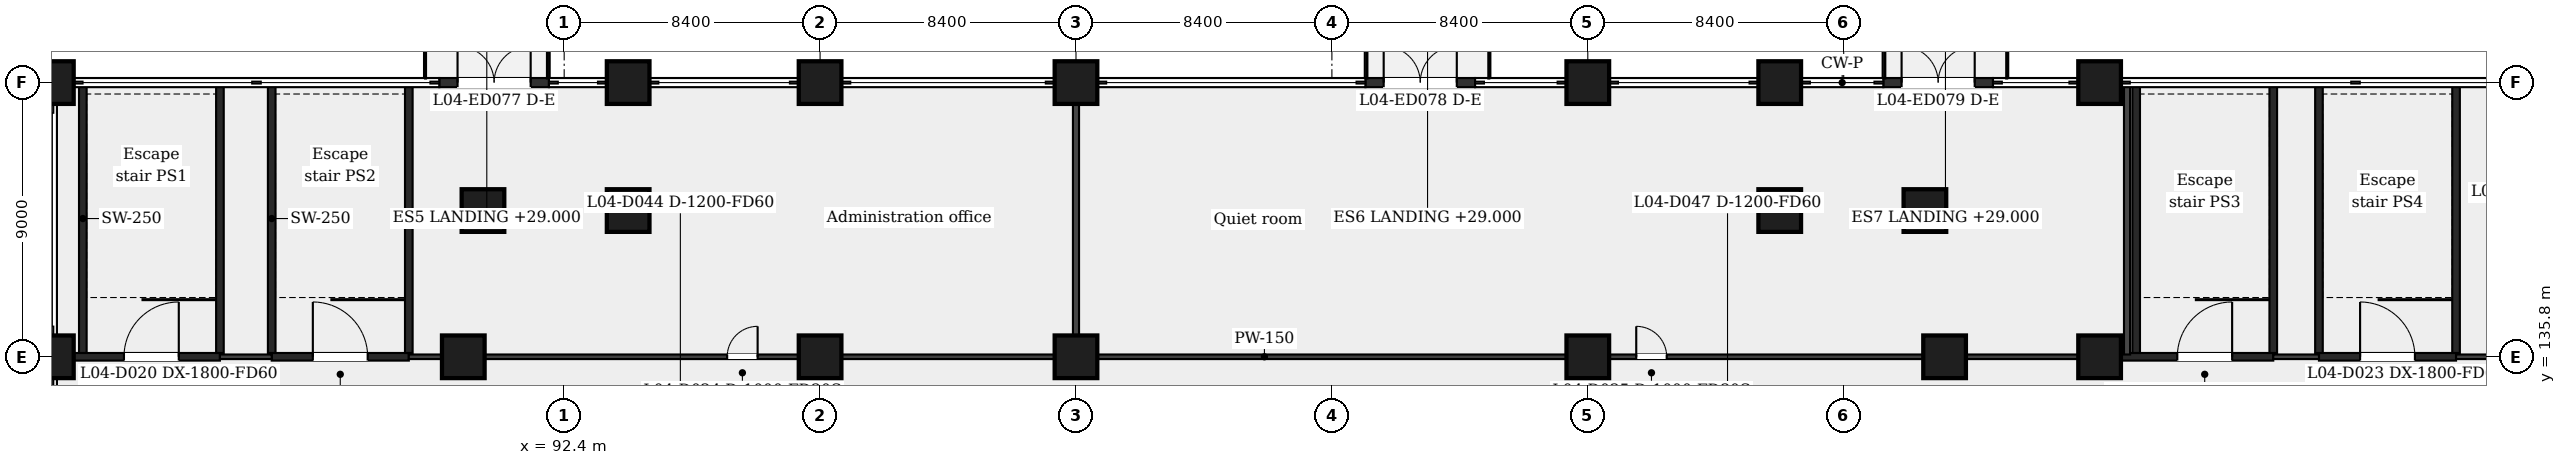
"""IFC4 building model, lengths in metres.
Left out: names, types, materials, properties, quantities, classifications, styles, units other than length and angle.
Written with IfcOpenShell. Run it as: python <this file> out.ifc"""

import sys

from ifc_helpers import new_model, si_unit, direction, frame, frame_2d, origin, origin_2d, place, context, subcontext, project, spatial, rectangle, extrude, element, fill, save


model = new_model("IFC4")
c1 = context("Model", 3, precision=1e-05, world=origin(), true_north=direction((0.0, 1.0)))
c2 = subcontext(c1, "Body", "Model", "MODEL_VIEW")
j1 = project(units=[si_unit("LENGTHUNIT", "METRE"), si_unit("PLANEANGLEUNIT", "RADIAN")], contexts=[c1])
p1 = place(None, origin())
s1 = spatial("IfcSite", under=j1, at=p1, CompositionType="ELEMENT")
p2 = place(p1, origin())
s2 = spatial("IfcBuilding", under=s1, at=p2, CompositionType="ELEMENT")
p3 = place(p2, frame((0.0, 0.0, 29.0)))
s3 = spatial("IfcBuildingStorey", under=s2, at=p3, CompositionType="ELEMENT", Elevation=29.0)
for number, where, z_axis, x_axis in (
    (1, (75.6, 135.8, 0.0), (0.0, 0.0, 1.0), (1.0, 0.0, 0.0)),
    (2, (89.088, 135.8, 0.0), (0.0, 0.0, 1.0), (1.0, 0.0, 0.0)),
    (3, (100.8, 135.8, 0.0), (0.0, 0.0, 1.0), (1.0, 0.0, 0.0)),
    (4, (109.2, 135.8, 0.0), (0.0, 0.0, 1.0), (1.0, 0.0, 0.0)),
    (5, (126.0, 135.8, 0.0), (0.0, 0.0, 1.0), (1.0, 0.0, 0.0)),
    (6, (137.711, 135.8, 0.0), (0.0, 0.0, 1.0), (1.0, 0.0, 0.0)),
    (7, (142.8, 135.8, 0.0), (0.0, 0.0, 1.0), (1.0, 0.0, 0.0)),
    (8, (89.735, 140.6, 0.0), (0.0, 0.0, 1.0), (1.0, 0.0, 0.0)),
    (9, (94.5, 140.6, 0.0), (0.0, 0.0, 1.0), (1.0, 0.0, 0.0)),
    (10, (132.3, 140.6, 0.0), (0.0, 0.0, 1.0), (1.0, 0.0, 0.0)),
    (11, (137.065, 140.6, 0.0), (0.0, 0.0, 1.0), (1.0, 0.0, 0.0)),
    (12, (75.6, 144.8, 0.0), (0.0, 0.0, 1.0), (1.0, 0.0, 0.0)),
    (13, (94.5, 144.8, 0.0), (0.0, 0.0, 1.0), (1.0, 0.0, 0.0)),
    (14, (100.8, 144.8, 0.0), (0.0, 0.0, 1.0), (1.0, 0.0, 0.0)),
    (15, (109.2, 144.8, 0.0), (0.0, 0.0, 1.0), (1.0, 0.0, 0.0)),
    (16, (126.0, 144.8, 0.0), (0.0, 0.0, 1.0), (1.0, 0.0, 0.0)),
    (17, (132.3, 144.8, 0.0), (0.0, 0.0, 1.0), (1.0, 0.0, 0.0)),
    (18, (142.8, 144.8, 0.0), (0.0, 0.0, 1.0), (1.0, 0.0, 0.0)),
):
    element("IfcColumn", number, at=place(p3, frame(where, z_axis=z_axis, x_axis=x_axis)), inside=s3, PredefinedType="COLUMN", context=c2, shape_type="SweptSolid", body=[
        extrude(rectangle(XDim=1.4, YDim=1.4, at=origin_2d()), origin(), (0.0, 0.0, 1.0), 5.0),
    ])
p4 = place(p3, frame((88.3, 144.8, 0.0), z_axis=(0.0, 0.0, 1.0), x_axis=(1.0, 0.0, 0.0)))
e19 = element("IfcWall", 19, at=p4, inside=s3, PredefinedType="SOLIDWALL", context=c2, shape_type="SweptSolid", body=[
    extrude(rectangle(XDim=3.6, YDim=0.3, at=frame_2d((1.8, 0.0))), origin(), (0.0, 0.0, 1.0), 4.4),
])
p5 = place(p4, frame((0.6, 0.0, 0.0)))
e20 = element("IfcOpeningElement", 20, at=p5, cuts=e19, PredefinedType="OPENING", context=c2, shape_type="SweptSolid", body=[
    extrude(rectangle(XDim=2.4, YDim=2.4, at=frame_2d((1.2, 1.2))), frame((0.0, 0.16, 0.0), z_axis=(0.0, -1.0, 0.0), x_axis=(1.0, 0.0, 0.0)), (0.0, 0.0, 1.0), 0.32),
])
p6 = place(p3, frame((118.7, 144.8, 0.0), z_axis=(0.0, 0.0, 1.0), x_axis=(1.0, 0.0, 0.0)))
e21 = element("IfcWall", 21, at=p6, inside=s3, PredefinedType="SOLIDWALL", context=c2, shape_type="SweptSolid", body=[
    extrude(rectangle(XDim=3.6, YDim=0.3, at=frame_2d((1.8, 0.0))), origin(), (0.0, 0.0, 1.0), 4.4),
])
p7 = place(p6, frame((0.6, 0.0, 0.0)))
e22 = element("IfcOpeningElement", 22, at=p7, cuts=e21, PredefinedType="OPENING", context=c2, shape_type="SweptSolid", body=[
    extrude(rectangle(XDim=2.4, YDim=2.4, at=frame_2d((1.2, 1.2))), frame((0.0, 0.16, 0.0), z_axis=(0.0, -1.0, 0.0), x_axis=(1.0, 0.0, 0.0)), (0.0, 0.0, 1.0), 0.32),
])
p8 = place(p3, frame((135.7, 144.8, 0.0), z_axis=(0.0, 0.0, 1.0), x_axis=(1.0, 0.0, 0.0)))
e23 = element("IfcWall", 23, at=p8, inside=s3, PredefinedType="SOLIDWALL", context=c2, shape_type="SweptSolid", body=[
    extrude(rectangle(XDim=3.6, YDim=0.3, at=frame_2d((1.8, 0.0))), origin(), (0.0, 0.0, 1.0), 4.4),
])
p9 = place(p8, frame((0.6, 0.0, 0.0)))
e24 = element("IfcOpeningElement", 24, at=p9, cuts=e23, PredefinedType="OPENING", context=c2, shape_type="SweptSolid", body=[
    extrude(rectangle(XDim=2.4, YDim=2.4, at=frame_2d((1.2, 1.2))), frame((0.0, 0.16, 0.0), z_axis=(0.0, -1.0, 0.0), x_axis=(1.0, 0.0, 0.0)), (0.0, 0.0, 1.0), 0.32),
])
p10 = place(p3, frame((76.27, 135.8, 0.0), z_axis=(0.0, 0.0, 1.0), x_axis=(1.0, 0.0, 0.0)))
e25 = element("IfcWall", 25, at=p10, inside=s3, PredefinedType="PARTITIONING", context=c2, shape_type="SweptSolid", body=[
    extrude(rectangle(XDim=4.83, YDim=0.25, at=frame_2d((2.415, 0.0))), origin(), (0.0, 0.0, 1.0), 4.4),
])
p11 = place(p10, frame((1.68, 0.0, 0.0)))
e26 = element("IfcOpeningElement", 26, at=p11, cuts=e25, PredefinedType="OPENING", context=c2, shape_type="SweptSolid", body=[
    extrude(rectangle(XDim=1.8, YDim=2.1, at=frame_2d((0.9, 1.05))), frame((0.0, 0.135, 0.0), z_axis=(0.0, -1.0, 0.0), x_axis=(1.0, 0.0, 0.0)), (0.0, 0.0, 1.0), 0.27),
])
p12 = place(p3, frame((82.8, 135.8, 0.0), z_axis=(0.0, 0.0, 1.0), x_axis=(1.0, 0.0, 0.0)))
e27 = element("IfcWall", 27, at=p12, inside=s3, PredefinedType="PARTITIONING", context=c2, shape_type="SweptSolid", body=[
    extrude(rectangle(XDim=4.5, YDim=0.25, at=frame_2d((2.25, 0.0))), origin(), (0.0, 0.0, 1.0), 4.4),
])
p13 = place(p12, frame((1.35, 0.0, 0.0)))
e28 = element("IfcOpeningElement", 28, at=p13, cuts=e27, PredefinedType="OPENING", context=c2, shape_type="SweptSolid", body=[
    extrude(rectangle(XDim=1.8, YDim=2.1, at=frame_2d((0.9, 1.05))), frame((0.0, 0.135, 0.0), z_axis=(0.0, -1.0, 0.0), x_axis=(1.0, 0.0, 0.0)), (0.0, 0.0, 1.0), 0.27),
])
p14 = place(p3, frame((143.47, 135.8, 0.0), z_axis=(0.0, 0.0, 1.0), x_axis=(1.0, 0.0, 0.0)))
e29 = element("IfcWall", 29, at=p14, inside=s3, PredefinedType="PARTITIONING", context=c2, shape_type="SweptSolid", body=[
    extrude(rectangle(XDim=5.03, YDim=0.25, at=frame_2d((2.515, 0.0))), origin(), (0.0, 0.0, 1.0), 4.4),
])
p15 = place(p14, frame((1.88, 0.0, 0.0)))
e30 = element("IfcOpeningElement", 30, at=p15, cuts=e29, PredefinedType="OPENING", context=c2, shape_type="SweptSolid", body=[
    extrude(rectangle(XDim=1.8, YDim=2.1, at=frame_2d((0.9, 1.05))), frame((0.0, 0.135, 0.0), z_axis=(0.0, -1.0, 0.0), x_axis=(1.0, 0.0, 0.0)), (0.0, 0.0, 1.0), 0.27),
])
p16 = place(p3, frame((150.0, 135.8, 0.0), z_axis=(0.0, 0.0, 1.0), x_axis=(1.0, 0.0, 0.0)))
e31 = element("IfcWall", 31, at=p16, inside=s3, PredefinedType="PARTITIONING", context=c2, shape_type="SweptSolid", body=[
    extrude(rectangle(XDim=4.5, YDim=0.25, at=frame_2d((2.25, 0.0))), origin(), (0.0, 0.0, 1.0), 4.4),
])
p17 = place(p16, frame((1.35, 0.0, 0.0)))
e32 = element("IfcOpeningElement", 32, at=p17, cuts=e31, PredefinedType="OPENING", context=c2, shape_type="SweptSolid", body=[
    extrude(rectangle(XDim=1.8, YDim=2.1, at=frame_2d((0.9, 1.05))), frame((0.0, 0.135, 0.0), z_axis=(0.0, -1.0, 0.0), x_axis=(1.0, 0.0, 0.0)), (0.0, 0.0, 1.0), 0.27),
])
p18 = place(p3, frame((75.65, 135.8, 0.0), z_axis=(0.0, 0.0, 1.0), x_axis=(1.0, 0.0, 0.0)))
e33 = element("IfcWall", 33, at=p18, inside=s3, PredefinedType="PARTITIONING", context=c2, shape_type="SweptSolid", body=[
    extrude(rectangle(XDim=0.62, YDim=0.15, at=frame_2d((0.31, 0.0))), origin(), (0.0, 0.0, 1.0), 4.4),
])
p19 = place(p3, frame((81.1, 135.8, 0.0), z_axis=(0.0, 0.0, 1.0), x_axis=(1.0, 0.0, 0.0)))
e34 = element("IfcWall", 34, at=p19, inside=s3, PredefinedType="PARTITIONING", context=c2, shape_type="SweptSolid", body=[
    extrude(rectangle(XDim=1.7, YDim=0.15, at=frame_2d((0.85, 0.0))), origin(), (0.0, 0.0, 1.0), 4.4),
])
p20 = place(p3, frame((87.3, 135.8, 0.0), z_axis=(0.0, 0.0, 1.0), x_axis=(1.0, 0.0, 0.0)))
e35 = element("IfcWall", 35, at=p20, inside=s3, PredefinedType="PARTITIONING", context=c2, shape_type="SweptSolid", body=[
    extrude(rectangle(XDim=56.17, YDim=0.15, at=frame_2d((28.085, 0.0))), origin(), (0.0, 0.0, 1.0), 4.4),
])
p21 = place(p20, frame((10.45, 0.0, 0.0)))
e36 = element("IfcOpeningElement", 36, at=p21, cuts=e35, PredefinedType="OPENING", context=c2, shape_type="SweptSolid", body=[
    extrude(rectangle(XDim=1.0, YDim=2.1, at=frame_2d((0.5, 1.05))), frame((0.0, 0.085, 0.0), z_axis=(0.0, -1.0, 0.0), x_axis=(1.0, 0.0, 0.0)), (0.0, 0.0, 1.0), 0.17),
])
p22 = place(p20, frame((40.29, 0.0, 0.0)))
e37 = element("IfcOpeningElement", 37, at=p22, cuts=e35, PredefinedType="OPENING", context=c2, shape_type="SweptSolid", body=[
    extrude(rectangle(XDim=1.0, YDim=2.1, at=frame_2d((0.5, 1.05))), frame((0.0, 0.085, 0.0), z_axis=(0.0, -1.0, 0.0), x_axis=(1.0, 0.0, 0.0)), (0.0, 0.0, 1.0), 0.17),
])
p23 = place(p3, frame((148.5, 135.8, 0.0), z_axis=(0.0, 0.0, 1.0), x_axis=(1.0, 0.0, 0.0)))
e38 = element("IfcWall", 38, at=p23, inside=s3, PredefinedType="PARTITIONING", context=c2, shape_type="SweptSolid", body=[
    extrude(rectangle(XDim=1.5, YDim=0.15, at=frame_2d((0.75, 0.0))), origin(), (0.0, 0.0, 1.0), 4.4),
])
p24 = place(p3, frame((154.5, 135.8, 0.0), z_axis=(0.0, 0.0, 1.0), x_axis=(1.0, 0.0, 0.0)))
e39 = element("IfcWall", 39, at=p24, inside=s3, PredefinedType="PARTITIONING", context=c2, shape_type="SweptSolid", body=[
    extrude(rectangle(XDim=5.05, YDim=0.15, at=frame_2d((2.525, 0.0))), origin(), (0.0, 0.0, 1.0), 4.4),
])
for number, where, z_axis, x_axis in (
    (40, (76.6, 135.925, 0.0), (0.0, 0.0, 1.0), (0.0, 1.0, 0.0)),
    (41, (81.1, 135.925, 0.0), (0.0, 0.0, 1.0), (0.0, 1.0, 0.0)),
    (42, (82.8, 135.925, 0.0), (0.0, 0.0, 1.0), (0.0, 1.0, 0.0)),
    (43, (87.3, 135.925, 0.0), (0.0, 0.0, 1.0), (0.0, 1.0, 0.0)),
):
    element("IfcWall", number, at=place(p3, frame(where, z_axis=z_axis, x_axis=x_axis)), inside=s3, PredefinedType="PARTITIONING", context=c2, shape_type="SweptSolid", body=[
        extrude(rectangle(XDim=8.825, YDim=0.25, at=frame_2d((4.413, 0.0))), origin(), (0.0, 0.0, 1.0), 4.4),
    ])
for number, where, z_axis, x_axis in (
    (44, (109.2, 135.875, 0.0), (0.0, 0.0, 1.0), (0.0, 1.0, 0.0)),
    (45, (143.7, 135.875, 0.0), (0.0, 0.0, 1.0), (0.0, 1.0, 0.0)),
):
    element("IfcWall", number, at=place(p3, frame(where, z_axis=z_axis, x_axis=x_axis)), inside=s3, PredefinedType="PARTITIONING", context=c2, shape_type="SweptSolid", body=[
        extrude(rectangle(XDim=8.875, YDim=0.2, at=frame_2d((4.438, 0.0))), origin(), (0.0, 0.0, 1.0), 4.4),
    ])
for number, where, z_axis, x_axis in (
    (46, (144.0, 135.925, 0.0), (0.0, 0.0, 1.0), (0.0, 1.0, 0.0)),
    (47, (148.5, 135.925, 0.0), (0.0, 0.0, 1.0), (0.0, 1.0, 0.0)),
    (48, (150.0, 135.925, 0.0), (0.0, 0.0, 1.0), (0.0, 1.0, 0.0)),
    (49, (154.5, 135.925, 0.0), (0.0, 0.0, 1.0), (0.0, 1.0, 0.0)),
):
    element("IfcWall", number, at=place(p3, frame(where, z_axis=z_axis, x_axis=x_axis)), inside=s3, PredefinedType="PARTITIONING", context=c2, shape_type="SweptSolid", body=[
        extrude(rectangle(XDim=8.825, YDim=0.25, at=frame_2d((4.413, 0.0))), origin(), (0.0, 0.0, 1.0), 4.4),
    ])
p25 = place(p5, origin())
e50 = element("IfcDoor", 50, at=p25, inside=s3, OperationType="DOUBLE_DOOR_DOUBLE_SWING", PredefinedType="DOOR", context=c2, shape_type="SweptSolid", body=[
    extrude(rectangle(XDim=2.4, YDim=2.4, at=frame_2d((1.2, 1.2))), frame((0.0, 0.025, 0.0), z_axis=(0.0, -1.0, 0.0), x_axis=(1.0, 0.0, 0.0)), (0.0, 0.0, 1.0), 0.05),
])
fill(e20, e50)
p26 = place(p7, origin())
e51 = element("IfcDoor", 51, at=p26, inside=s3, OperationType="DOUBLE_DOOR_DOUBLE_SWING", PredefinedType="DOOR", context=c2, shape_type="SweptSolid", body=[
    extrude(rectangle(XDim=2.4, YDim=2.4, at=frame_2d((1.2, 1.2))), frame((0.0, 0.025, 0.0), z_axis=(0.0, -1.0, 0.0), x_axis=(1.0, 0.0, 0.0)), (0.0, 0.0, 1.0), 0.05),
])
fill(e22, e51)
p27 = place(p9, origin())
e52 = element("IfcDoor", 52, at=p27, inside=s3, OperationType="DOUBLE_DOOR_DOUBLE_SWING", PredefinedType="DOOR", context=c2, shape_type="SweptSolid", body=[
    extrude(rectangle(XDim=2.4, YDim=2.4, at=frame_2d((1.2, 1.2))), frame((0.0, 0.025, 0.0), z_axis=(0.0, -1.0, 0.0), x_axis=(1.0, 0.0, 0.0)), (0.0, 0.0, 1.0), 0.05),
])
fill(e24, e52)
p28 = place(p11, origin())
e53 = element("IfcDoor", 53, at=p28, inside=s3, OperationType="SINGLE_SWING_RIGHT", PredefinedType="DOOR", context=c2, shape_type="SweptSolid", body=[
    extrude(rectangle(XDim=1.8, YDim=2.1, at=frame_2d((0.9, 1.05))), frame((0.0, 0.025, 0.0), z_axis=(0.0, -1.0, 0.0), x_axis=(1.0, 0.0, 0.0)), (0.0, 0.0, 1.0), 0.05),
])
fill(e26, e53)
p29 = place(p13, origin())
e54 = element("IfcDoor", 54, at=p29, inside=s3, OperationType="SINGLE_SWING_LEFT", PredefinedType="DOOR", context=c2, shape_type="SweptSolid", body=[
    extrude(rectangle(XDim=1.8, YDim=2.1, at=frame_2d((0.9, 1.05))), frame((0.0, 0.025, 0.0), z_axis=(0.0, -1.0, 0.0), x_axis=(1.0, 0.0, 0.0)), (0.0, 0.0, 1.0), 0.05),
])
fill(e28, e54)
p30 = place(p15, origin())
e55 = element("IfcDoor", 55, at=p30, inside=s3, OperationType="SINGLE_SWING_RIGHT", PredefinedType="DOOR", context=c2, shape_type="SweptSolid", body=[
    extrude(rectangle(XDim=1.8, YDim=2.1, at=frame_2d((0.9, 1.05))), frame((0.0, 0.025, 0.0), z_axis=(0.0, -1.0, 0.0), x_axis=(1.0, 0.0, 0.0)), (0.0, 0.0, 1.0), 0.05),
])
fill(e30, e55)
p31 = place(p17, origin())
e56 = element("IfcDoor", 56, at=p31, inside=s3, OperationType="SINGLE_SWING_LEFT", PredefinedType="DOOR", context=c2, shape_type="SweptSolid", body=[
    extrude(rectangle(XDim=1.8, YDim=2.1, at=frame_2d((0.9, 1.05))), frame((0.0, 0.025, 0.0), z_axis=(0.0, -1.0, 0.0), x_axis=(1.0, 0.0, 0.0)), (0.0, 0.0, 1.0), 0.05),
])
fill(e32, e56)
p32 = place(p21, origin())
e57 = element("IfcDoor", 57, at=p32, inside=s3, OperationType="SINGLE_SWING_RIGHT", PredefinedType="DOOR", context=c2, shape_type="SweptSolid", body=[
    extrude(rectangle(XDim=1.0, YDim=2.1, at=frame_2d((0.5, 1.05))), frame((0.0, 0.025, 0.0), z_axis=(0.0, -1.0, 0.0), x_axis=(1.0, 0.0, 0.0)), (0.0, 0.0, 1.0), 0.05),
])
fill(e36, e57)
p33 = place(p22, origin())
e58 = element("IfcDoor", 58, at=p33, inside=s3, OperationType="SINGLE_SWING_LEFT", PredefinedType="DOOR", context=c2, shape_type="SweptSolid", body=[
    extrude(rectangle(XDim=1.0, YDim=2.1, at=frame_2d((0.5, 1.05))), frame((0.0, 0.025, 0.0), z_axis=(0.0, -1.0, 0.0), x_axis=(1.0, 0.0, 0.0)), (0.0, 0.0, 1.0), 0.05),
])
fill(e37, e58)
save(model, sys.argv[1])
